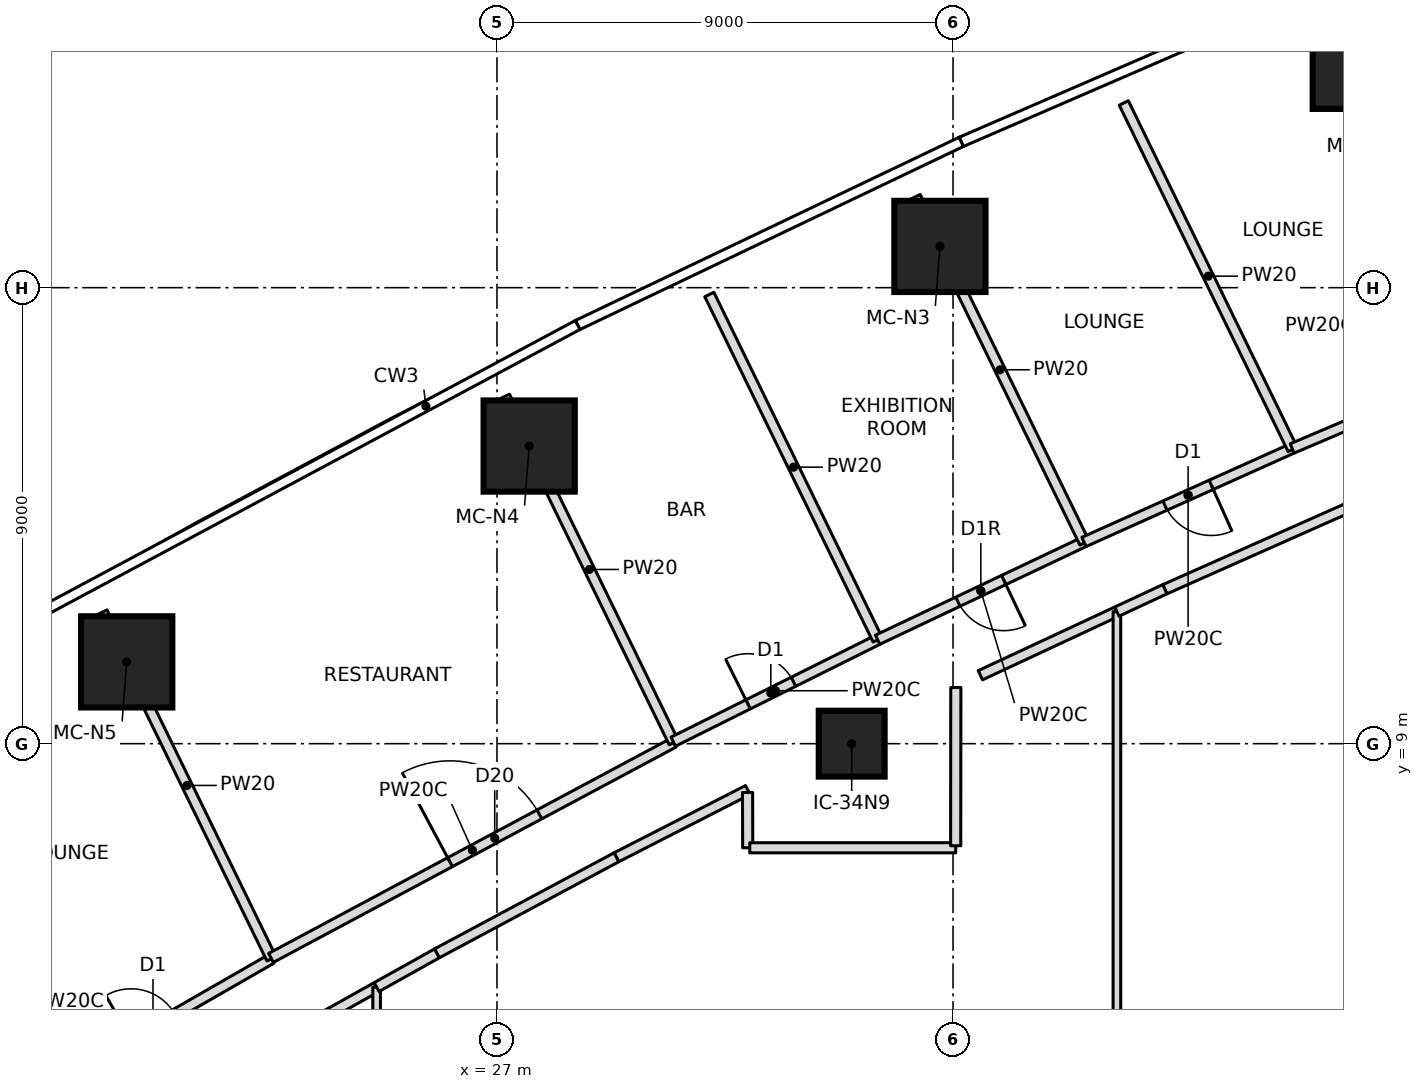
"""IFC4 building model, lengths in metres.
Left out: names, types, materials, properties, quantities, classifications, styles, units other than length and angle.
Written with IfcOpenShell. Run it as: python <this file> out.ifc"""

import sys

from ifc_helpers import new_model, si_unit, direction, frame, frame_2d, origin, origin_2d, place, context, subcontext, project, spatial, rectangle, extrude, element, fill, save


model = new_model("IFC4")
c1 = context("Model", 3, precision=1e-05, world=origin(), true_north=direction((0.0, 1.0)))
c2 = subcontext(c1, "Body", "Model", "MODEL_VIEW")
j1 = project(units=[si_unit("LENGTHUNIT", "METRE"), si_unit("PLANEANGLEUNIT", "RADIAN")], contexts=[c1])
p1 = place(None, origin())
s1 = spatial("IfcSite", under=j1, at=p1, CompositionType="ELEMENT")
p2 = place(p1, origin())
s2 = spatial("IfcBuilding", under=s1, at=p2, CompositionType="ELEMENT")
p3 = place(p2, frame((0.0, 0.0, 35.0)))
s3 = spatial("IfcBuildingStorey", under=s2, at=p3, CompositionType="ELEMENT", Elevation=35.0)
for number, where, z_axis, x_axis in (
    (1, (43.998, 22.428, 0.0), (0.0, 0.0, 1.0), (1.0, 0.0, 0.0)),
    (2, (35.741, 18.814, 0.0), (0.0, 0.0, 1.0), (1.0, 0.0, 0.0)),
    (3, (27.635, 14.874, 0.0), (0.0, 0.0, 1.0), (1.0, 0.0, 0.0)),
    (4, (19.693, 10.615, 0.0), (0.0, 0.0, 1.0), (1.0, 0.0, 0.0)),
):
    element("IfcColumn", number, at=place(p3, frame(where, z_axis=z_axis, x_axis=x_axis)), inside=s3, PredefinedType="COLUMN", context=c2, shape_type="SweptSolid", body=[
        extrude(rectangle(XDim=1.8, YDim=1.8, at=origin_2d()), origin(), (0.0, 0.0, 1.0), 4.6),
    ])
p4 = place(p3, frame((34.0, 9.0, 0.0), z_axis=(0.0, 0.0, 1.0), x_axis=(1.0, 0.0, 0.0)))
e5 = element("IfcColumn", 5, at=p4, inside=s3, PredefinedType="COLUMN", context=c2, shape_type="SweptSolid", body=[
    extrude(rectangle(XDim=1.3, YDim=1.3, at=origin_2d()), origin(), (0.0, 0.0, 1.0), 4.6),
])
p5 = place(p3, frame((17.874, 2.068, 0.0), z_axis=(0.0, 0.0, 1.0), x_axis=(0.867093061484, 0.4981461861, 0.0)))
e6 = element("IfcWall", 6, at=p5, inside=s3, PredefinedType="PARTITIONING", context=c2, shape_type="SweptSolid", body=[
    extrude(rectangle(XDim=5.393, YDim=0.2, at=frame_2d((2.697, 0.0))), origin(), (0.0, 0.0, 1.0), 4.3),
])
p6 = place(p5, frame((2.197, 0.0, 0.0)))
e7 = element("IfcOpeningElement", 7, at=p6, cuts=e6, PredefinedType="OPENING", context=c2, shape_type="SweptSolid", body=[
    extrude(rectangle(XDim=1.0, YDim=2.1, at=frame_2d((0.5, 1.05))), frame((0.0, 0.11, 0.0), z_axis=(0.0, -1.0, 0.0), x_axis=(1.0, 0.0, 0.0)), (0.0, 0.0, 1.0), 0.22),
])
p7 = place(p3, frame((22.55, 4.755, 0.0), z_axis=(0.0, 0.0, 1.0), x_axis=(-0.438210669268, 0.898872298683, 0.0)))
e8 = element("IfcWall", 8, at=p7, inside=s3, PredefinedType="PARTITIONING", context=c2, shape_type="SweptSolid", body=[
    extrude(rectangle(XDim=7.612, YDim=0.2, at=frame_2d((3.806, 0.0))), origin(), (0.0, 0.0, 1.0), 4.3),
])
p8 = place(p3, frame((22.541, 4.773, 0.0), z_axis=(0.0, 0.0, 1.0), x_axis=(0.881864282024, 0.471503327762, 0.0)))
e9 = element("IfcWall", 9, at=p8, inside=s3, PredefinedType="PARTITIONING", context=c2, shape_type="SweptSolid", body=[
    extrude(rectangle(XDim=9.012, YDim=0.2, at=frame_2d((4.506, 0.0))), origin(), (0.0, 0.0, 1.0), 4.3),
])
p9 = place(p8, frame((4.006, 0.0, 0.0)))
e10 = element("IfcOpeningElement", 10, at=p9, cuts=e9, PredefinedType="OPENING", context=c2, shape_type="SweptSolid", body=[
    extrude(rectangle(XDim=2.0, YDim=2.4, at=frame_2d((1.0, 1.2))), frame((0.0, 0.11, 0.0), z_axis=(0.0, -1.0, 0.0), x_axis=(1.0, 0.0, 0.0)), (0.0, 0.0, 1.0), 0.22),
])
p10 = place(p3, frame((30.489, 9.022, 0.0), z_axis=(0.0, 0.0, 1.0), x_axis=(-0.43822365664, 0.898865967072, 0.0)))
e11 = element("IfcWall", 11, at=p10, inside=s3, PredefinedType="PARTITIONING", context=c2, shape_type="SweptSolid", body=[
    extrude(rectangle(XDim=7.601, YDim=0.2, at=frame_2d((3.801, 0.0))), origin(), (0.0, 0.0, 1.0), 4.3),
])
p11 = place(p3, frame((30.48, 9.04, 0.0), z_axis=(0.0, 0.0, 1.0), x_axis=(0.894989913054, 0.446086376761, 0.0)))
e12 = element("IfcWall", 12, at=p11, inside=s3, PredefinedType="PARTITIONING", context=c2, shape_type="SweptSolid", body=[
    extrude(rectangle(XDim=4.506, YDim=0.2, at=frame_2d((2.253, 0.0))), origin(), (0.0, 0.0, 1.0), 4.3),
])
p12 = place(p11, frame((1.65, 0.0, 0.0)))
e13 = element("IfcOpeningElement", 13, at=p12, cuts=e12, PredefinedType="OPENING", context=c2, shape_type="SweptSolid", body=[
    extrude(rectangle(XDim=1.0, YDim=2.1, at=frame_2d((0.5, 1.05))), frame((0.0, 0.11, 0.0), z_axis=(0.0, -1.0, 0.0), x_axis=(1.0, 0.0, 0.0)), (0.0, 0.0, 1.0), 0.22),
])
p13 = place(p3, frame((34.513, 11.05, 0.0), z_axis=(0.0, 0.0, 1.0), x_axis=(-0.438187612283, 0.898883538865, 0.0)))
e14 = element("IfcWall", 14, at=p13, inside=s3, PredefinedType="PARTITIONING", context=c2, shape_type="SweptSolid", body=[
    extrude(rectangle(XDim=7.582, YDim=0.2, at=frame_2d((3.791, 0.0))), origin(), (0.0, 0.0, 1.0), 4.3),
])
p14 = place(p3, frame((38.585, 12.981, 0.0), z_axis=(0.0, 0.0, 1.0), x_axis=(-0.903706948966, -0.428151550727, 0.0)))
e15 = element("IfcWall", 15, at=p14, inside=s3, PredefinedType="PARTITIONING", context=c2, shape_type="SweptSolid", body=[
    extrude(rectangle(XDim=4.506, YDim=0.2, at=frame_2d((2.253, 0.0))), origin(), (0.0, 0.0, 1.0), 4.3),
])
p15 = place(p14, frame((1.753, 0.0, 0.0)))
e16 = element("IfcOpeningElement", 16, at=p15, cuts=e15, PredefinedType="OPENING", context=c2, shape_type="SweptSolid", body=[
    extrude(rectangle(XDim=1.0, YDim=2.1, at=frame_2d((0.5, 1.05))), frame((0.0, 0.11, 0.0), z_axis=(0.0, -1.0, 0.0), x_axis=(1.0, 0.0, 0.0)), (0.0, 0.0, 1.0), 0.22),
])
p16 = place(p3, frame((38.594, 12.963, 0.0), z_axis=(0.0, 0.0, 1.0), x_axis=(-0.438197705697, 0.898878618459, 0.0)))
e17 = element("IfcWall", 17, at=p16, inside=s3, PredefinedType="PARTITIONING", context=c2, shape_type="SweptSolid", body=[
    extrude(rectangle(XDim=7.601, YDim=0.2, at=frame_2d((3.801, 0.0))), origin(), (0.0, 0.0, 1.0), 4.3),
])
p17 = place(p3, frame((42.694, 14.827, 0.0), z_axis=(0.0, 0.0, 1.0), x_axis=(-0.912193063794, -0.409760679381, 0.0)))
e18 = element("IfcWall", 18, at=p17, inside=s3, PredefinedType="PARTITIONING", context=c2, shape_type="SweptSolid", body=[
    extrude(rectangle(XDim=4.505, YDim=0.2, at=frame_2d((2.252, 0.0))), origin(), (0.0, 0.0, 1.0), 4.3),
])
p18 = place(p17, frame((1.752, 0.0, 0.0)))
e19 = element("IfcOpeningElement", 19, at=p18, cuts=e18, PredefinedType="OPENING", context=c2, shape_type="SweptSolid", body=[
    extrude(rectangle(XDim=1.0, YDim=2.1, at=frame_2d((0.5, 1.05))), frame((0.0, 0.11, 0.0), z_axis=(0.0, -1.0, 0.0), x_axis=(1.0, 0.0, 0.0)), (0.0, 0.0, 1.0), 0.22),
])
p19 = place(p3, frame((42.703, 14.809, 0.0), z_axis=(0.0, 0.0, 1.0), x_axis=(-0.438202247191, 0.898876404494, 0.0)))
e20 = element("IfcWall", 20, at=p19, inside=s3, PredefinedType="PARTITIONING", context=c2, shape_type="SweptSolid", body=[
    extrude(rectangle(XDim=7.605, YDim=0.2, at=frame_2d((3.802, 0.0))), origin(), (0.0, 0.0, 1.0), 4.3),
])
p20 = place(p3, frame((46.844, 16.591, 0.0), z_axis=(0.0, 0.0, 1.0), x_axis=(-0.92031727314, -0.39117274542, 0.0)))
e21 = element("IfcWall", 21, at=p20, inside=s3, PredefinedType="PARTITIONING", context=c2, shape_type="SweptSolid", body=[
    extrude(rectangle(XDim=4.509, YDim=0.2, at=frame_2d((2.254, 0.0))), origin(), (0.0, 0.0, 1.0), 4.3),
])
p21 = place(p20, frame((1.754, 0.0, 0.0)))
e22 = element("IfcOpeningElement", 22, at=p21, cuts=e21, PredefinedType="OPENING", context=c2, shape_type="SweptSolid", body=[
    extrude(rectangle(XDim=1.0, YDim=2.1, at=frame_2d((0.5, 1.05))), frame((0.0, 0.11, 0.0), z_axis=(0.0, -1.0, 0.0), x_axis=(1.0, 0.0, 0.0)), (0.0, 0.0, 1.0), 0.22),
])
p22 = place(p3, frame((22.312, 2.903, 0.0), z_axis=(0.0, 0.0, 1.0), x_axis=(0.87283266248, 0.48801961365, 0.0)))
e23 = element("IfcWall", 23, at=p22, inside=s3, PredefinedType="PARTITIONING", context=c2, shape_type="SweptSolid", body=[
    extrude(rectangle(XDim=2.649, YDim=0.2, at=frame_2d((1.325, 0.0))), origin(), (0.0, 0.0, 1.0), 4.3),
])
p23 = place(p3, frame((24.625, -4.196, 0.0), z_axis=(0.0, 0.0, 1.0), x_axis=(0.0, 1.0, 0.0)))
e24 = element("IfcWall", 24, at=p23, inside=s3, PredefinedType="PARTITIONING", context=c2, shape_type="SweptSolid", body=[
    extrude(rectangle(XDim=8.392, YDim=0.15, at=frame_2d((4.196, 0.0))), origin(), (0.0, 0.0, 1.0), 4.3),
])
p24 = place(p3, frame((29.357, 6.758, 0.0), z_axis=(0.0, 0.0, 1.0), x_axis=(0.890213377055, 0.455543788579, 0.0)))
e25 = element("IfcWall", 25, at=p24, inside=s3, PredefinedType="PARTITIONING", context=c2, shape_type="SweptSolid", body=[
    extrude(rectangle(XDim=2.912, YDim=0.2, at=frame_2d((1.456, 0.0))), origin(), (0.0, 0.0, 1.0), 4.3),
])
p25 = place(p3, frame((36.54, 10.351, 0.0), z_axis=(0.0, 0.0, 1.0), x_axis=(0.90636141858, 0.422503229467, 0.0)))
e26 = element("IfcWall", 26, at=p25, inside=s3, PredefinedType="PARTITIONING", context=c2, shape_type="SweptSolid", body=[
    extrude(rectangle(XDim=2.972, YDim=0.2, at=frame_2d((1.486, 0.0))), origin(), (0.0, 0.0, 1.0), 4.3),
])
p26 = place(p3, frame((24.625, 4.196, 0.0), z_axis=(0.0, 0.0, 1.0), x_axis=(0.872737500828, 0.488189773191, 0.0)))
e27 = element("IfcWall", 27, at=p26, inside=s3, PredefinedType="PARTITIONING", context=c2, shape_type="SweptSolid", body=[
    extrude(rectangle(XDim=1.366, YDim=0.2, at=frame_2d((0.683, 0.0))), origin(), (0.0, 0.0, 1.0), 4.3),
])
p27 = place(p3, frame((25.817, 4.863, 0.0), z_axis=(0.0, 0.0, 1.0), x_axis=(0.881655245922, 0.471894084874, 0.0)))
e28 = element("IfcWall", 28, at=p27, inside=s3, PredefinedType="PARTITIONING", context=c2, shape_type="SweptSolid", body=[
    extrude(rectangle(XDim=4.016, YDim=0.2, at=frame_2d((2.008, 0.0))), origin(), (0.0, 0.0, 1.0), 4.3),
])
p28 = place(p3, frame((39.234, -11.607, 0.0), z_axis=(0.0, 0.0, 1.0), x_axis=(0.0, 1.0, 0.0)))
e29 = element("IfcWall", 29, at=p28, inside=s3, PredefinedType="PARTITIONING", context=c2, shape_type="SweptSolid", body=[
    extrude(rectangle(XDim=23.214, YDim=0.15, at=frame_2d((11.607, 0.0))), origin(), (0.0, 0.0, 1.0), 4.3),
])
p29 = place(p3, frame((40.18, 12.048, 0.0), z_axis=(0.0, 0.0, 1.0), x_axis=(0.913986953061, 0.405743576209, 0.0)))
e30 = element("IfcWall", 30, at=p29, inside=s3, PredefinedType="PARTITIONING", context=c2, shape_type="SweptSolid", body=[
    extrude(rectangle(XDim=4.016, YDim=0.2, at=frame_2d((2.008, 0.0))), origin(), (0.0, 0.0, 1.0), 4.3),
])
p30 = place(p3, frame((39.234, 11.607, 0.0), z_axis=(0.0, 0.0, 1.0), x_axis=(0.906308643899, 0.422616424188, 0.0)))
e31 = element("IfcWall", 31, at=p30, inside=s3, PredefinedType="PARTITIONING", context=c2, shape_type="SweptSolid", body=[
    extrude(rectangle(XDim=1.043, YDim=0.2, at=frame_2d((0.521, 0.0))), origin(), (0.0, 0.0, 1.0), 4.3),
])
p31 = place(p3, frame((31.945, 8.037, 0.0), z_axis=(0.0, 0.0, 1.0), x_axis=(0.003129875123, -0.999995101929, 0.0)))
e32 = element("IfcWall", 32, at=p31, inside=s3, PredefinedType="PARTITIONING", context=c2, shape_type="SweptSolid", body=[
    extrude(rectangle(XDim=1.092, YDim=0.2, at=frame_2d((0.546, 0.0))), origin(), (0.0, 0.0, 1.0), 4.3),
])
p32 = place(p3, frame((31.989, 6.945, 0.0), z_axis=(0.0, 0.0, 1.0), x_axis=(0.999999998196, 6.0074492e-05, 0.0)))
e33 = element("IfcWall", 33, at=p32, inside=s3, PredefinedType="PARTITIONING", context=c2, shape_type="SweptSolid", body=[
    extrude(rectangle(XDim=4.064, YDim=0.2, at=frame_2d((2.032, 0.0))), origin(), (0.0, 0.0, 1.0), 4.3),
])
p33 = place(p3, frame((36.052, 6.986, 0.0), z_axis=(0.0, 0.0, 1.0), x_axis=(0.000781799464, 0.999999694395, 0.0)))
e34 = element("IfcWall", 34, at=p33, inside=s3, PredefinedType="PARTITIONING", context=c2, shape_type="SweptSolid", body=[
    extrude(rectangle(XDim=3.123, YDim=0.2, at=frame_2d((1.562, 0.0))), origin(), (0.0, 0.0, 1.0), 4.3),
])
p34 = place(p9, origin())
e35 = element("IfcDoor", 35, at=p34, inside=s3, OperationType="DOUBLE_DOOR_SINGLE_SWING", PredefinedType="DOOR", context=c2, shape_type="SweptSolid", body=[
    extrude(rectangle(XDim=2.0, YDim=2.4, at=frame_2d((1.0, 1.2))), frame((0.0, 0.025, 0.0), z_axis=(0.0, -1.0, 0.0), x_axis=(1.0, 0.0, 0.0)), (0.0, 0.0, 1.0), 0.05),
])
fill(e10, e35)
p35 = place(p12, origin())
e36 = element("IfcDoor", 36, at=p35, inside=s3, OperationType="SINGLE_SWING_LEFT", PredefinedType="DOOR", context=c2, shape_type="SweptSolid", body=[
    extrude(rectangle(XDim=1.0, YDim=2.1, at=frame_2d((0.5, 1.05))), frame((0.0, 0.025, 0.0), z_axis=(0.0, -1.0, 0.0), x_axis=(1.0, 0.0, 0.0)), (0.0, 0.0, 1.0), 0.05),
])
fill(e13, e36)
p36 = place(p15, origin())
e37 = element("IfcDoor", 37, at=p36, inside=s3, OperationType="SINGLE_SWING_RIGHT", PredefinedType="DOOR", context=c2, shape_type="SweptSolid", body=[
    extrude(rectangle(XDim=1.0, YDim=2.1, at=frame_2d((0.5, 1.05))), frame((0.0, 0.025, 0.0), z_axis=(0.0, -1.0, 0.0), x_axis=(1.0, 0.0, 0.0)), (0.0, 0.0, 1.0), 0.05),
])
fill(e16, e37)
p37 = place(p18, origin())
e38 = element("IfcDoor", 38, at=p37, inside=s3, OperationType="SINGLE_SWING_LEFT", PredefinedType="DOOR", context=c2, shape_type="SweptSolid", body=[
    extrude(rectangle(XDim=1.0, YDim=2.1, at=frame_2d((0.5, 1.05))), frame((0.0, 0.025, 0.0), z_axis=(0.0, -1.0, 0.0), x_axis=(1.0, 0.0, 0.0)), (0.0, 0.0, 1.0), 0.05),
])
fill(e19, e38)
save(model, sys.argv[1])
